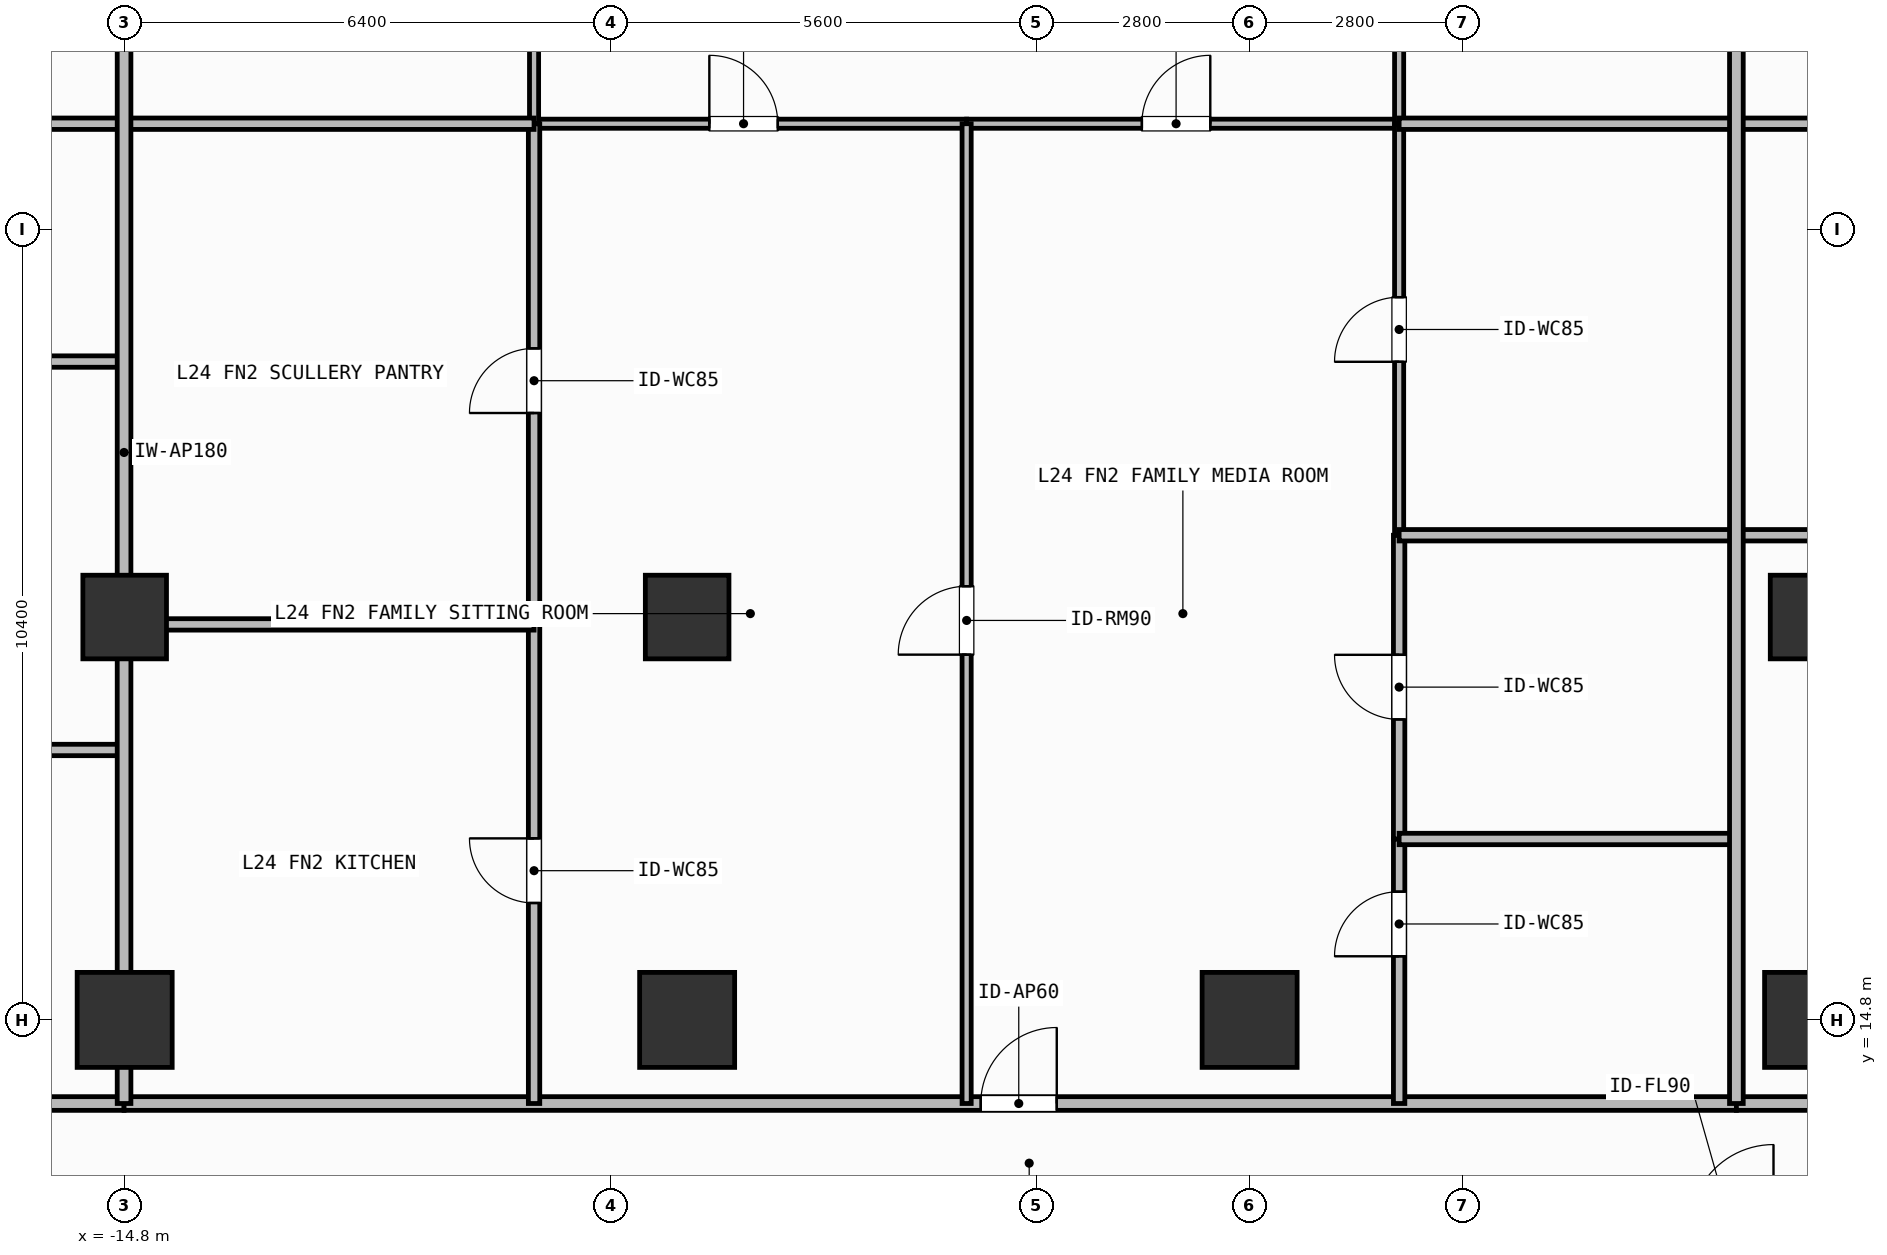
"""IFC4 building model, lengths in metres.
Left out: names, types, materials, properties, quantities, classifications, styles, units other than length and angle.
Written with IfcOpenShell. Run it as: python <this file> out.ifc"""

import sys

from ifc_helpers import new_model, si_unit, direction, frame, frame_2d, origin, origin_2d, place, context, subcontext, project, spatial, rectangle, extrude, element, fill, save


model = new_model("IFC4")
c1 = context("Model", 3, precision=1e-05, world=origin(), true_north=direction((0.0, 1.0)))
c2 = subcontext(c1, "Body", "Model", "MODEL_VIEW")
j1 = project(units=[si_unit("LENGTHUNIT", "METRE"), si_unit("PLANEANGLEUNIT", "RADIAN")], contexts=[c1])
p1 = place(None, origin())
s1 = spatial("IfcSite", under=j1, at=p1, CompositionType="ELEMENT")
p2 = place(p1, origin())
s2 = spatial("IfcBuilding", under=s1, at=p2, CompositionType="ELEMENT")
p3 = place(p2, frame((0.0, 0.0, 96.9)))
s3 = spatial("IfcBuildingStorey", under=s2, at=p3, CompositionType="ELEMENT", Elevation=96.9)
for number, where, z_axis, x_axis in (
    (1, (-14.8, 14.8, 0.0), (0.0, 0.0, 1.0), (1.0, 0.0, 0.0)),
    (2, (-7.4, 14.8, 0.0), (0.0, 0.0, 1.0), (1.0, 0.0, 0.0)),
    (3, (0.0, 14.8, 0.0), (0.0, 0.0, 1.0), (1.0, 0.0, 0.0)),
    (4, (7.4, 14.8, 0.0), (0.0, 0.0, 1.0), (1.0, 0.0, 0.0)),
):
    element("IfcColumn", number, at=place(p3, frame(where, z_axis=z_axis, x_axis=x_axis)), inside=s3, PredefinedType="COLUMN", context=c2, shape_type="SweptSolid", body=[
        extrude(rectangle(XDim=1.25, YDim=1.25, at=origin_2d()), origin(), (0.0, 0.0, 1.0), 3.9),
    ])
for number, where, z_axis, x_axis in (
    (5, (-14.8, 20.1, 0.0), (0.0, 0.0, 1.0), (1.0, 0.0, 0.0)),
    (6, (-7.4, 20.1, 0.0), (0.0, 0.0, 1.0), (1.0, 0.0, 0.0)),
    (7, (7.4, 20.1, 0.0), (0.0, 0.0, 1.0), (1.0, 0.0, 0.0)),
):
    element("IfcColumn", number, at=place(p3, frame(where, z_axis=z_axis, x_axis=x_axis)), inside=s3, PredefinedType="COLUMN", context=c2, shape_type="SweptSolid", body=[
        extrude(rectangle(XDim=1.1, YDim=1.1, at=origin_2d()), origin(), (0.0, 0.0, 1.0), 3.9),
    ])
p4 = place(p3, frame((-24.42, 13.7, 0.0), z_axis=(0.0, 0.0, 1.0), x_axis=(1.0, 0.0, 0.0)))
e8 = element("IfcWall", 8, at=p4, inside=s3, PredefinedType="PARTITIONING", context=c2, shape_type="SweptSolid", body=[
    extrude(rectangle(XDim=9.612, YDim=0.18, at=frame_2d((4.806, 0.0))), origin(), (0.0, 0.0, 1.0), 3.68),
])
p5 = place(p4, frame((1.748, 0.0, 0.0)))
e9 = element("IfcOpeningElement", 9, at=p5, cuts=e8, PredefinedType="OPENING", context=c2, shape_type="SweptSolid", body=[
    extrude(rectangle(XDim=1.0, YDim=2.2, at=frame_2d((0.5, 1.1))), frame((0.0, 0.1, 0.0), z_axis=(0.0, -1.0, 0.0), x_axis=(1.0, 0.0, 0.0)), (0.0, 0.0, 1.0), 0.2),
])
p6 = place(p3, frame((-14.808, 13.7, 0.0), z_axis=(0.0, 0.0, 1.0), x_axis=(1.0, 0.0, 0.0)))
e10 = element("IfcWall", 10, at=p6, inside=s3, PredefinedType="PARTITIONING", context=c2, shape_type="SweptSolid", body=[
    extrude(rectangle(XDim=21.212, YDim=0.18, at=frame_2d((10.606, 0.0))), origin(), (0.0, 0.0, 1.0), 3.68),
])
p7 = place(p6, frame((11.271, 0.0, 0.0)))
e11 = element("IfcOpeningElement", 11, at=p7, cuts=e10, PredefinedType="OPENING", context=c2, shape_type="SweptSolid", body=[
    extrude(rectangle(XDim=1.0, YDim=2.2, at=frame_2d((0.5, 1.1))), frame((0.0, 0.1, 0.0), z_axis=(0.0, -1.0, 0.0), x_axis=(1.0, 0.0, 0.0)), (0.0, 0.0, 1.0), 0.2),
])
p8 = place(p3, frame((-9.414, 26.59, 0.0), z_axis=(0.0, 0.0, 1.0), x_axis=(1.0, 0.0, 0.0)))
e12 = element("IfcWall", 12, at=p8, inside=s3, PredefinedType="PARTITIONING", context=c2, shape_type="SweptSolid", body=[
    extrude(rectangle(XDim=5.691, YDim=0.12, at=frame_2d((2.846, 0.0))), origin(), (0.0, 0.0, 1.0), 3.68),
])
p9 = place(p8, frame((2.306, 0.0, 0.0)))
e13 = element("IfcOpeningElement", 13, at=p9, cuts=e12, PredefinedType="OPENING", context=c2, shape_type="SweptSolid", body=[
    extrude(rectangle(XDim=0.9, YDim=2.1, at=frame_2d((0.45, 1.05))), frame((0.0, 0.07, 0.0), z_axis=(0.0, -1.0, 0.0), x_axis=(1.0, 0.0, 0.0)), (0.0, 0.0, 1.0), 0.14),
])
p10 = place(p3, frame((-3.723, 26.59, 0.0), z_axis=(0.0, 0.0, 1.0), x_axis=(1.0, 0.0, 0.0)))
e14 = element("IfcWall", 14, at=p10, inside=s3, PredefinedType="PARTITIONING", context=c2, shape_type="SweptSolid", body=[
    extrude(rectangle(XDim=5.69, YDim=0.12, at=frame_2d((2.845, 0.0))), origin(), (0.0, 0.0, 1.0), 3.68),
])
p11 = place(p10, frame((2.306, 0.0, 0.0)))
e15 = element("IfcOpeningElement", 15, at=p11, cuts=e14, PredefinedType="OPENING", context=c2, shape_type="SweptSolid", body=[
    extrude(rectangle(XDim=0.9, YDim=2.1, at=frame_2d((0.45, 1.05))), frame((0.0, 0.07, 0.0), z_axis=(0.0, -1.0, 0.0), x_axis=(1.0, 0.0, 0.0)), (0.0, 0.0, 1.0), 0.14),
])
p12 = place(p3, frame((-3.723, 13.7, 0.0), z_axis=(0.0, 0.0, 1.0), x_axis=(0.0, 1.0, 0.0)))
e16 = element("IfcWall", 16, at=p12, inside=s3, PredefinedType="PARTITIONING", context=c2, shape_type="SweptSolid", body=[
    extrude(rectangle(XDim=12.89, YDim=0.12, at=frame_2d((6.445, 0.0))), origin(), (0.0, 0.0, 1.0), 3.68),
])
p13 = place(p12, frame((5.905, 0.0, 0.0)))
e17 = element("IfcOpeningElement", 17, at=p13, cuts=e16, PredefinedType="OPENING", context=c2, shape_type="SweptSolid", body=[
    extrude(rectangle(XDim=0.9, YDim=2.1, at=frame_2d((0.45, 1.05))), frame((0.0, 0.07, 0.0), z_axis=(0.0, -1.0, 0.0), x_axis=(1.0, 0.0, 0.0)), (0.0, 0.0, 1.0), 0.14),
])
p14 = place(p3, frame((-9.414, 13.7, 0.0), z_axis=(0.0, 0.0, 1.0), x_axis=(0.0, 1.0, 0.0)))
e18 = element("IfcWall", 18, at=p14, inside=s3, PredefinedType="PARTITIONING", context=c2, shape_type="SweptSolid", body=[
    extrude(rectangle(XDim=6.303, YDim=0.15, at=frame_2d((3.151, 0.0))), origin(), (0.0, 0.0, 1.0), 3.68),
])
p15 = place(p14, frame((2.638, 0.0, 0.0)))
e19 = element("IfcOpeningElement", 19, at=p15, cuts=e18, PredefinedType="OPENING", context=c2, shape_type="SweptSolid", body=[
    extrude(rectangle(XDim=0.85, YDim=2.1, at=frame_2d((0.425, 1.05))), frame((0.0, 0.085, 0.0), z_axis=(0.0, -1.0, 0.0), x_axis=(1.0, 0.0, 0.0)), (0.0, 0.0, 1.0), 0.17),
])
p16 = place(p3, frame((-9.414, 20.003, 0.0), z_axis=(0.0, 0.0, 1.0), x_axis=(0.0, 1.0, 0.0)))
e20 = element("IfcWall", 20, at=p16, inside=s3, PredefinedType="PARTITIONING", context=c2, shape_type="SweptSolid", body=[
    extrude(rectangle(XDim=6.587, YDim=0.15, at=frame_2d((3.293, 0.0))), origin(), (0.0, 0.0, 1.0), 3.68),
])
p17 = place(p16, frame((2.781, 0.0, 0.0)))
e21 = element("IfcOpeningElement", 21, at=p17, cuts=e20, PredefinedType="OPENING", context=c2, shape_type="SweptSolid", body=[
    extrude(rectangle(XDim=0.85, YDim=2.1, at=frame_2d((0.425, 1.05))), frame((0.0, 0.085, 0.0), z_axis=(0.0, -1.0, 0.0), x_axis=(1.0, 0.0, 0.0)), (0.0, 0.0, 1.0), 0.17),
])
p18 = place(p3, frame((-9.414, 26.59, 0.0), z_axis=(0.0, 0.0, 1.0), x_axis=(0.0, 1.0, 0.0)))
e22 = element("IfcWall", 22, at=p18, inside=s3, PredefinedType="PARTITIONING", context=c2, shape_type="SweptSolid", body=[
    extrude(rectangle(XDim=4.24, YDim=0.12, at=frame_2d((2.12, 0.0))), origin(), (0.0, 0.0, 1.0), 3.68),
])
p19 = place(p18, frame((1.581, 0.0, 0.0)))
e23 = element("IfcOpeningElement", 23, at=p19, cuts=e22, PredefinedType="OPENING", context=c2, shape_type="SweptSolid", body=[
    extrude(rectangle(XDim=0.9, YDim=2.1, at=frame_2d((0.45, 1.05))), frame((0.0, 0.07, 0.0), z_axis=(0.0, -1.0, 0.0), x_axis=(1.0, 0.0, 0.0)), (0.0, 0.0, 1.0), 0.14),
])
p20 = place(p3, frame((1.967, 13.7, 0.0), z_axis=(0.0, 0.0, 1.0), x_axis=(0.0, 1.0, 0.0)))
e24 = element("IfcWall", 24, at=p20, inside=s3, PredefinedType="PARTITIONING", context=c2, shape_type="SweptSolid", body=[
    extrude(rectangle(XDim=3.48, YDim=0.15, at=frame_2d((1.74, 0.0))), origin(), (0.0, 0.0, 1.0), 3.68),
])
p21 = place(p20, frame((1.937, 0.0, 0.0)))
e25 = element("IfcOpeningElement", 25, at=p21, cuts=e24, PredefinedType="OPENING", context=c2, shape_type="SweptSolid", body=[
    extrude(rectangle(XDim=0.85, YDim=2.1, at=frame_2d((0.425, 1.05))), frame((0.0, 0.085, 0.0), z_axis=(0.0, -1.0, 0.0), x_axis=(1.0, 0.0, 0.0)), (0.0, 0.0, 1.0), 0.17),
])
p22 = place(p3, frame((1.967, 17.18, 0.0), z_axis=(0.0, 0.0, 1.0), x_axis=(0.0, 1.0, 0.0)))
e26 = element("IfcWall", 26, at=p22, inside=s3, PredefinedType="PARTITIONING", context=c2, shape_type="SweptSolid", body=[
    extrude(rectangle(XDim=3.996, YDim=0.15, at=frame_2d((1.998, 0.0))), origin(), (0.0, 0.0, 1.0), 3.68),
])
p23 = place(p22, frame((1.573, 0.0, 0.0)))
e27 = element("IfcOpeningElement", 27, at=p23, cuts=e26, PredefinedType="OPENING", context=c2, shape_type="SweptSolid", body=[
    extrude(rectangle(XDim=0.85, YDim=2.1, at=frame_2d((0.425, 1.05))), frame((0.0, 0.085, 0.0), z_axis=(0.0, -1.0, 0.0), x_axis=(1.0, 0.0, 0.0)), (0.0, 0.0, 1.0), 0.17),
])
p24 = place(p3, frame((1.967, 21.176, 0.0), z_axis=(0.0, 0.0, 1.0), x_axis=(0.0, 1.0, 0.0)))
e28 = element("IfcWall", 28, at=p24, inside=s3, PredefinedType="PARTITIONING", context=c2, shape_type="SweptSolid", body=[
    extrude(rectangle(XDim=5.414, YDim=0.12, at=frame_2d((2.707, 0.0))), origin(), (0.0, 0.0, 1.0), 3.68),
])
p25 = place(p24, frame((2.282, 0.0, 0.0)))
e29 = element("IfcOpeningElement", 29, at=p25, cuts=e28, PredefinedType="OPENING", context=c2, shape_type="SweptSolid", body=[
    extrude(rectangle(XDim=0.85, YDim=2.1, at=frame_2d((0.425, 1.05))), frame((0.0, 0.07, 0.0), z_axis=(0.0, -1.0, 0.0), x_axis=(1.0, 0.0, 0.0)), (0.0, 0.0, 1.0), 0.14),
])
p26 = place(p3, frame((1.967, 26.59, 0.0), z_axis=(0.0, 0.0, 1.0), x_axis=(0.0, 1.0, 0.0)))
e30 = element("IfcWall", 30, at=p26, inside=s3, PredefinedType="PARTITIONING", context=c2, shape_type="SweptSolid", body=[
    extrude(rectangle(XDim=4.24, YDim=0.12, at=frame_2d((2.12, 0.0))), origin(), (0.0, 0.0, 1.0), 3.68),
])
p27 = place(p26, frame((1.581, 0.0, 0.0)))
e31 = element("IfcOpeningElement", 31, at=p27, cuts=e30, PredefinedType="OPENING", context=c2, shape_type="SweptSolid", body=[
    extrude(rectangle(XDim=0.9, YDim=2.1, at=frame_2d((0.45, 1.05))), frame((0.0, 0.07, 0.0), z_axis=(0.0, -1.0, 0.0), x_axis=(1.0, 0.0, 0.0)), (0.0, 0.0, 1.0), 0.14),
])
p28 = place(p3, frame((6.404, 13.7, 0.0), z_axis=(0.0, 0.0, 1.0), x_axis=(1.0, 0.0, 0.0)))
e32 = element("IfcWall", 32, at=p28, inside=s3, PredefinedType="PARTITIONING", context=c2, shape_type="SweptSolid", body=[
    extrude(rectangle(XDim=12.216, YDim=0.18, at=frame_2d((6.108, 0.0))), origin(), (0.0, 0.0, 1.0), 3.68),
])
p29 = place(p28, frame((5.34, 0.0, 0.0)))
e33 = element("IfcOpeningElement", 33, at=p29, cuts=e32, PredefinedType="OPENING", context=c2, shape_type="SweptSolid", body=[
    extrude(rectangle(XDim=1.0, YDim=2.2, at=frame_2d((0.5, 1.1))), frame((0.0, 0.1, 0.0), z_axis=(0.0, -1.0, 0.0), x_axis=(1.0, 0.0, 0.0)), (0.0, 0.0, 1.0), 0.2),
])
for number, where, z_axis, x_axis in (
    (34, (-20.721, 18.351, 0.0), (0.0, 0.0, 1.0), (1.0, 0.0, 0.0)),
    (35, (-20.721, 23.461, 0.0), (0.0, 0.0, 1.0), (1.0, 0.0, 0.0)),
    (36, (-20.721, 26.59, 0.0), (0.0, 0.0, 1.0), (1.0, 0.0, 0.0)),
):
    element("IfcWall", number, at=place(p3, frame(where, z_axis=z_axis, x_axis=x_axis)), inside=s3, PredefinedType="PARTITIONING", context=c2, shape_type="SweptSolid", body=[
        extrude(rectangle(XDim=5.913, YDim=0.15, at=frame_2d((2.957, 0.0))), origin(), (0.0, 0.0, 1.0), 3.68),
    ])
p30 = place(p3, frame((-14.808, 20.003, 0.0), z_axis=(0.0, 0.0, 1.0), x_axis=(1.0, 0.0, 0.0)))
e37 = element("IfcWall", 37, at=p30, inside=s3, PredefinedType="PARTITIONING", context=c2, shape_type="SweptSolid", body=[
    extrude(rectangle(XDim=5.394, YDim=0.15, at=frame_2d((2.697, 0.0))), origin(), (0.0, 0.0, 1.0), 3.082),
])
p31 = place(p3, frame((-14.808, 26.59, 0.0), z_axis=(0.0, 0.0, 1.0), x_axis=(1.0, 0.0, 0.0)))
e38 = element("IfcWall", 38, at=p31, inside=s3, PredefinedType="PARTITIONING", context=c2, shape_type="SweptSolid", body=[
    extrude(rectangle(XDim=5.394, YDim=0.15, at=frame_2d((2.697, 0.0))), origin(), (0.0, 0.0, 1.0), 3.68),
])
for number, where, z_axis, x_axis in (
    (39, (1.967, 17.18, 0.0), (0.0, 0.0, 1.0), (1.0, 0.0, 0.0)),
    (40, (1.967, 21.176, 0.0), (0.0, 0.0, 1.0), (1.0, 0.0, 0.0)),
    (41, (1.967, 26.59, 0.0), (0.0, 0.0, 1.0), (1.0, 0.0, 0.0)),
):
    element("IfcWall", number, at=place(p3, frame(where, z_axis=z_axis, x_axis=x_axis)), inside=s3, PredefinedType="PARTITIONING", context=c2, shape_type="SweptSolid", body=[
        extrude(rectangle(XDim=4.437, YDim=0.15, at=frame_2d((2.219, 0.0))), origin(), (0.0, 0.0, 1.0), 3.68),
    ])
p32 = place(p3, frame((-14.808, 13.7, 0.0), z_axis=(0.0, 0.0, 1.0), x_axis=(0.0, 1.0, 0.0)))
e42 = element("IfcWall", 42, at=p32, inside=s3, PredefinedType="PARTITIONING", context=c2, shape_type="SweptSolid", body=[
    extrude(rectangle(XDim=17.13, YDim=0.18, at=frame_2d((8.565, 0.0))), origin(), (0.0, 0.0, 1.0), 3.082),
])
for number, where, z_axis, x_axis in (
    (43, (6.404, 21.176, 0.0), (0.0, 0.0, 1.0), (1.0, 0.0, 0.0)),
    (44, (6.404, 26.59, 0.0), (0.0, 0.0, 1.0), (1.0, 0.0, 0.0)),
):
    element("IfcWall", number, at=place(p3, frame(where, z_axis=z_axis, x_axis=x_axis)), inside=s3, PredefinedType="PARTITIONING", context=c2, shape_type="SweptSolid", body=[
        extrude(rectangle(XDim=4.129, YDim=0.15, at=frame_2d((2.064, 0.0))), origin(), (0.0, 0.0, 1.0), 3.68),
    ])
p33 = place(p3, frame((6.404, 13.7, 0.0), z_axis=(0.0, 0.0, 1.0), x_axis=(0.0, 1.0, 0.0)))
e45 = element("IfcWall", 45, at=p33, inside=s3, PredefinedType="PARTITIONING", context=c2, shape_type="SweptSolid", body=[
    extrude(rectangle(XDim=17.13, YDim=0.18, at=frame_2d((8.565, 0.0))), origin(), (0.0, 0.0, 1.0), 3.68),
])
p34 = place(p7, origin())
e46 = element("IfcDoor", 46, at=p34, inside=s3, OperationType="SINGLE_SWING_RIGHT", PredefinedType="DOOR", context=c2, shape_type="SweptSolid", body=[
    extrude(rectangle(XDim=1.0, YDim=2.2, at=frame_2d((0.5, 1.1))), frame((0.0, 0.025, 0.0), z_axis=(0.0, -1.0, 0.0), x_axis=(1.0, 0.0, 0.0)), (0.0, 0.0, 1.0), 0.05),
])
fill(e11, e46)
p35 = place(p9, origin())
e47 = element("IfcDoor", 47, at=p35, inside=s3, OperationType="SINGLE_SWING_LEFT", PredefinedType="DOOR", context=c2, shape_type="SweptSolid", body=[
    extrude(rectangle(XDim=0.9, YDim=2.1, at=frame_2d((0.45, 1.05))), frame((0.0, 0.025, 0.0), z_axis=(0.0, -1.0, 0.0), x_axis=(1.0, 0.0, 0.0)), (0.0, 0.0, 1.0), 0.05),
])
fill(e13, e47)
p36 = place(p11, origin())
e48 = element("IfcDoor", 48, at=p36, inside=s3, OperationType="SINGLE_SWING_RIGHT", PredefinedType="DOOR", context=c2, shape_type="SweptSolid", body=[
    extrude(rectangle(XDim=0.9, YDim=2.1, at=frame_2d((0.45, 1.05))), frame((0.0, 0.025, 0.0), z_axis=(0.0, -1.0, 0.0), x_axis=(1.0, 0.0, 0.0)), (0.0, 0.0, 1.0), 0.05),
])
fill(e15, e48)
p37 = place(p13, origin())
e49 = element("IfcDoor", 49, at=p37, inside=s3, OperationType="SINGLE_SWING_LEFT", PredefinedType="DOOR", context=c2, shape_type="SweptSolid", body=[
    extrude(rectangle(XDim=0.9, YDim=2.1, at=frame_2d((0.45, 1.05))), frame((0.0, 0.025, 0.0), z_axis=(0.0, -1.0, 0.0), x_axis=(1.0, 0.0, 0.0)), (0.0, 0.0, 1.0), 0.05),
])
fill(e17, e49)
p38 = place(p15, origin())
e50 = element("IfcDoor", 50, at=p38, inside=s3, OperationType="SINGLE_SWING_RIGHT", PredefinedType="DOOR", context=c2, shape_type="SweptSolid", body=[
    extrude(rectangle(XDim=0.85, YDim=2.1, at=frame_2d((0.425, 1.05))), frame((0.0, 0.025, 0.0), z_axis=(0.0, -1.0, 0.0), x_axis=(1.0, 0.0, 0.0)), (0.0, 0.0, 1.0), 0.05),
])
fill(e19, e50)
p39 = place(p17, origin())
e51 = element("IfcDoor", 51, at=p39, inside=s3, OperationType="SINGLE_SWING_LEFT", PredefinedType="DOOR", context=c2, shape_type="SweptSolid", body=[
    extrude(rectangle(XDim=0.85, YDim=2.1, at=frame_2d((0.425, 1.05))), frame((0.0, 0.025, 0.0), z_axis=(0.0, -1.0, 0.0), x_axis=(1.0, 0.0, 0.0)), (0.0, 0.0, 1.0), 0.05),
])
fill(e21, e51)
p40 = place(p21, origin())
e52 = element("IfcDoor", 52, at=p40, inside=s3, OperationType="SINGLE_SWING_LEFT", PredefinedType="DOOR", context=c2, shape_type="SweptSolid", body=[
    extrude(rectangle(XDim=0.85, YDim=2.1, at=frame_2d((0.425, 1.05))), frame((0.0, 0.025, 0.0), z_axis=(0.0, -1.0, 0.0), x_axis=(1.0, 0.0, 0.0)), (0.0, 0.0, 1.0), 0.05),
])
fill(e25, e52)
p41 = place(p23, origin())
e53 = element("IfcDoor", 53, at=p41, inside=s3, OperationType="SINGLE_SWING_RIGHT", PredefinedType="DOOR", context=c2, shape_type="SweptSolid", body=[
    extrude(rectangle(XDim=0.85, YDim=2.1, at=frame_2d((0.425, 1.05))), frame((0.0, 0.025, 0.0), z_axis=(0.0, -1.0, 0.0), x_axis=(1.0, 0.0, 0.0)), (0.0, 0.0, 1.0), 0.05),
])
fill(e27, e53)
p42 = place(p25, origin())
e54 = element("IfcDoor", 54, at=p42, inside=s3, OperationType="SINGLE_SWING_LEFT", PredefinedType="DOOR", context=c2, shape_type="SweptSolid", body=[
    extrude(rectangle(XDim=0.85, YDim=2.1, at=frame_2d((0.425, 1.05))), frame((0.0, 0.025, 0.0), z_axis=(0.0, -1.0, 0.0), x_axis=(1.0, 0.0, 0.0)), (0.0, 0.0, 1.0), 0.05),
])
fill(e29, e54)
save(model, sys.argv[1])
